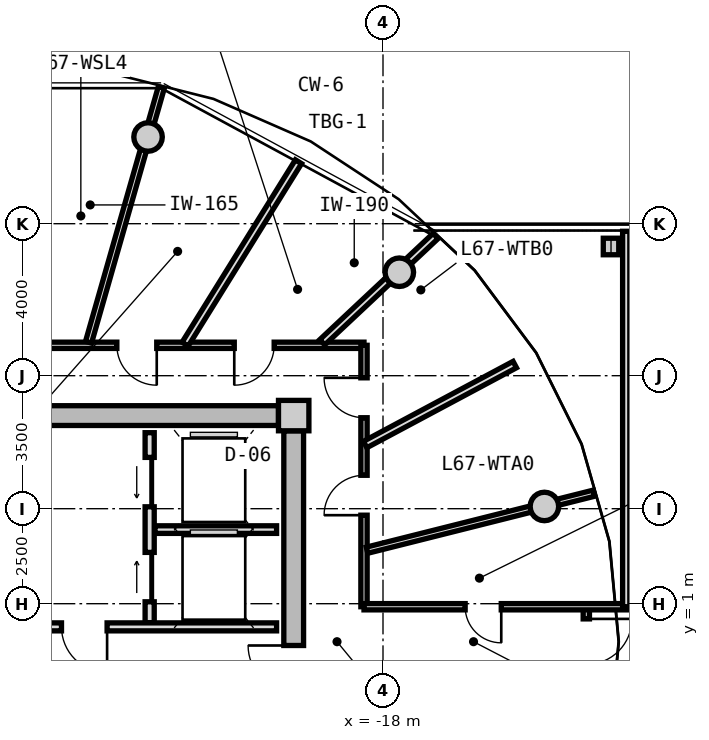
"""IFC4 building model, lengths in metres.
Left out: names, types, materials, properties, quantities, classifications, styles, units other than length and angle.
Written with IfcOpenShell. Run it as: python <this file> out.ifc"""

import sys

from ifc_helpers import new_model, si_unit, direction, frame, frame_2d, origin, origin_2d, place, context, subcontext, project, spatial, rectangle, circle, i_section, extrude, source, transform, mapped, element, fill, save


model = new_model("IFC4")
c1 = context("Model", 3, precision=1e-05, world=origin(), true_north=direction((0.0, 1.0)))
c2 = subcontext(c1, "Body", "Model", "MODEL_VIEW")
j1 = project(units=[si_unit("LENGTHUNIT", "METRE"), si_unit("PLANEANGLEUNIT", "RADIAN")], contexts=[c1])
p1 = place(None, origin())
s1 = spatial("IfcSite", under=j1, at=p1, CompositionType="ELEMENT")
p2 = place(p1, origin())
s2 = spatial("IfcBuilding", under=s1, at=p2, CompositionType="ELEMENT")
p3 = place(p2, frame((0.0, 0.0, 216.95)))
s3 = spatial("IfcBuildingStorey", under=s2, at=p3, CompositionType="ELEMENT", Elevation=216.95)
m1 = source(origin(), c2, "Body", "SweptSolid", [
    extrude(rectangle(XDim=0.8, YDim=0.8, at=origin_2d()), origin(), (0.0, 0.0, 1.0), 3.05),
])
p4 = place(p3, frame((-20.35, 5.95, 0.0), z_axis=(0.0, 0.0, 1.0), x_axis=(1.0, 0.0, 0.0)))
e1 = element("IfcColumn", 1, at=p4, inside=s3, PredefinedType="COLUMN", context=c2, shape_type="MappedRepresentation", body=[
    mapped(m1, transform((0.0, 0.0, 0.0), x_axis=(1.0, 0.0, 0.0), y_axis=(0.0, 1.0, 0.0), z_axis=(0.0, 0.0, 1.0), scale=1.0)),
])
m2 = source(origin(), c2, "Body", "SweptSolid", [
    extrude(rectangle(XDim=14.5, YDim=0.52, at=frame_2d((7.25, 0.0))), origin(), (0.0, 0.0, 1.0), 2.76),
])
p5 = place(p3, frame((-35.25, 5.95, 0.0), z_axis=(0.0, 0.0, 1.0), x_axis=(1.0, 0.0, 0.0)))
e2 = element("IfcWall", 2, at=p5, inside=s3, PredefinedType="SHEAR", context=c2, shape_type="MappedRepresentation", body=[
    mapped(m2, transform((0.0, 0.0, 0.0), x_axis=(1.0, 0.0, 0.0), y_axis=(0.0, 1.0, 0.0), z_axis=(0.0, 0.0, 1.0), scale=1.0)),
])
m3 = source(origin(), c2, "Body", "SweptSolid", [
    extrude(rectangle(XDim=11.1, YDim=0.52, at=frame_2d((5.55, 0.0))), origin(), (0.0, 0.0, 1.0), 2.76),
])
p6 = place(p3, frame((-20.35, 5.55, 0.0), z_axis=(0.0, 0.0, 1.0), x_axis=(0.0, -1.0, 0.0)))
e3 = element("IfcWall", 3, at=p6, inside=s3, PredefinedType="SHEAR", context=c2, shape_type="MappedRepresentation", body=[
    mapped(m3, transform((0.0, 0.0, 0.0), x_axis=(1.0, 0.0, 0.0), y_axis=(0.0, 1.0, 0.0), z_axis=(0.0, 0.0, 1.0), scale=1.0)),
])
p7 = place(p6, frame((5.65, 0.0, 0.0)))
e4 = element("IfcOpeningElement", 4, at=p7, cuts=e3, PredefinedType="OPENING", context=c2, shape_type="SweptSolid", body=[
    extrude(rectangle(XDim=1.2, YDim=2.15, at=frame_2d((0.6, 1.075))), frame((0.0, 0.27, 0.0), z_axis=(0.0, -1.0, 0.0), x_axis=(1.0, 0.0, 0.0)), (0.0, 0.0, 1.0), 0.54),
])
m4 = source(origin(), c2, "Body", "SweptSolid", [
    extrude(circle(Radius=0.375, at=origin_2d()), origin(), (0.0, 0.0, 1.0), 3.05),
])
for number, where, z_axis, x_axis in (
    (5, (-13.753, 3.559, 0.0), (0.0, 0.0, 1.0), (1.0, 0.0, 0.0)),
    (6, (-17.57, 9.723, 0.0), (0.0, 0.0, 1.0), (1.0, 0.0, 0.0)),
    (7, (-24.182, 13.281, 0.0), (0.0, 0.0, 1.0), (1.0, 0.0, 0.0)),
):
    element("IfcColumn", number, at=place(p3, frame(where, z_axis=z_axis, x_axis=x_axis)), inside=s3, PredefinedType="COLUMN", context=c2, shape_type="MappedRepresentation", body=[
        mapped(m4, transform((0.0, 0.0, 0.0), x_axis=(1.0, 0.0, 0.0), y_axis=(0.0, 1.0, 0.0), z_axis=(0.0, 0.0, 1.0), scale=1.0)),
    ])
m5 = source(origin(), c2, "Body", "SweptSolid", [
    extrude(i_section(OverallWidth=0.407, OverallDepth=0.435, WebThickness=0.024, FlangeThickness=0.039, FilletRadius=0.015, at=origin_2d()), origin(), (0.0, 0.0, 1.0), 3.05),
])
p8 = place(p3, frame((-12.0, 10.4, 0.0), z_axis=(0.0, 0.0, 1.0), x_axis=(1.0, 0.0, 0.0)))
e8 = element("IfcColumn", 8, at=p8, inside=s3, PredefinedType="COLUMN", context=c2, shape_type="MappedRepresentation", body=[
    mapped(m5, transform((0.0, 0.0, 0.0), x_axis=(1.0, 0.0, 0.0), y_axis=(0.0, 1.0, 0.0), z_axis=(0.0, 0.0, 1.0), scale=1.0)),
])
m6 = source(origin(), c2, "Body", "SweptSolid", [
    extrude(rectangle(XDim=5.0, YDim=0.24, at=frame_2d((2.5, 0.0))), origin(), (0.0, 0.0, 1.0), 2.745),
])
p9 = place(p3, frame((-24.14, 0.5, 0.0), z_axis=(0.0, 0.0, 1.0), x_axis=(0.0, 1.0, 0.0)))
e9 = element("IfcWall", 9, at=p9, inside=s3, PredefinedType="PARTITIONING", context=c2, shape_type="MappedRepresentation", body=[
    mapped(m6, transform((0.0, 0.0, 0.0), x_axis=(1.0, 0.0, 0.0), y_axis=(0.0, 1.0, 0.0), z_axis=(0.0, 0.0, 1.0), scale=1.0)),
])
p10 = place(p9, frame((3.05, 0.0, 0.0)))
e10 = element("IfcOpeningElement", 10, at=p10, cuts=e9, PredefinedType="OPENING", context=c2, shape_type="SweptSolid", body=[
    extrude(rectangle(XDim=1.3, YDim=2.2, at=frame_2d((0.65, 1.1))), frame((0.0, 0.13, 0.0), z_axis=(0.0, -1.0, 0.0), x_axis=(1.0, 0.0, 0.0)), (0.0, 0.0, 1.0), 0.26),
])
p11 = place(p9, frame((0.55, 0.0, 0.0)))
e11 = element("IfcOpeningElement", 11, at=p11, cuts=e9, PredefinedType="OPENING", context=c2, shape_type="SweptSolid", body=[
    extrude(rectangle(XDim=1.3, YDim=2.2, at=frame_2d((0.65, 1.1))), frame((0.0, 0.13, 0.0), z_axis=(0.0, -1.0, 0.0), x_axis=(1.0, 0.0, 0.0)), (0.0, 0.0, 1.0), 0.26),
])
m7 = source(origin(), c2, "Body", "SweptSolid", [
    extrude(rectangle(XDim=3.2, YDim=0.2, at=frame_2d((1.6, 0.0))), origin(), (0.0, 0.0, 1.0), 2.745),
])
p12 = place(p3, frame((-24.0, 2.95, 0.0), z_axis=(0.0, 0.0, 1.0), x_axis=(1.0, 0.0, 0.0)))
e12 = element("IfcWall", 12, at=p12, inside=s3, PredefinedType="PARTITIONING", context=c2, shape_type="MappedRepresentation", body=[
    mapped(m7, transform((0.0, 0.0, 0.0), x_axis=(1.0, 0.0, 0.0), y_axis=(0.0, 1.0, 0.0), z_axis=(0.0, 0.0, 1.0), scale=1.0)),
])
m8 = source(origin(), c2, "Body", "SweptSolid", [
    extrude(rectangle(XDim=6.66, YDim=0.21, at=frame_2d((3.33, 0.0))), origin(), (0.0, 0.0, 1.0), 2.745),
])
p13 = place(p3, frame((-27.46, 0.39, 0.0), z_axis=(0.0, 0.0, 1.0), x_axis=(1.0, 0.0, 0.0)))
e13 = element("IfcWall", 13, at=p13, inside=s3, PredefinedType="PARTITIONING", context=c2, shape_type="MappedRepresentation", body=[
    mapped(m8, transform((0.0, 0.0, 0.0), x_axis=(1.0, 0.0, 0.0), y_axis=(0.0, 1.0, 0.0), z_axis=(0.0, 0.0, 1.0), scale=1.0)),
])
p14 = place(p13, frame((1.0, 0.0, 0.0)))
e14 = element("IfcOpeningElement", 14, at=p14, cuts=e13, PredefinedType="OPENING", context=c2, shape_type="SweptSolid", body=[
    extrude(rectangle(XDim=1.2, YDim=2.15, at=frame_2d((0.6, 1.075))), frame((0.0, 0.115, 0.0), z_axis=(0.0, -1.0, 0.0), x_axis=(1.0, 0.0, 0.0)), (0.0, 0.0, 1.0), 0.23),
])
m9 = source(origin(), c2, "Body", "SweptSolid", [
    extrude(rectangle(XDim=8.58, YDim=0.165, at=frame_2d((4.29, 0.0))), origin(), (0.0, 0.0, 1.0), 2.745),
])
p15 = place(p3, frame((-27.08, 7.8, 0.0), z_axis=(0.0, 0.0, 1.0), x_axis=(1.0, 0.0, 0.0)))
e15 = element("IfcWall", 15, at=p15, inside=s3, PredefinedType="PARTITIONING", context=c2, shape_type="MappedRepresentation", body=[
    mapped(m9, transform((0.0, 0.0, 0.0), x_axis=(1.0, 0.0, 0.0), y_axis=(0.0, 1.0, 0.0), z_axis=(0.0, 0.0, 1.0), scale=1.0)),
])
p16 = place(p15, frame((5.166, 0.0, 0.0)))
e16 = element("IfcOpeningElement", 16, at=p16, cuts=e15, PredefinedType="OPENING", context=c2, shape_type="SweptSolid", body=[
    extrude(rectangle(XDim=1.05, YDim=2.15, at=frame_2d((0.525, 1.075))), frame((0.0, 0.093, 0.0), z_axis=(0.0, -1.0, 0.0), x_axis=(1.0, 0.0, 0.0)), (0.0, 0.0, 1.0), 0.185),
])
p17 = place(p15, frame((2.076, 0.0, 0.0)))
e17 = element("IfcOpeningElement", 17, at=p17, cuts=e15, PredefinedType="OPENING", context=c2, shape_type="SweptSolid", body=[
    extrude(rectangle(XDim=1.05, YDim=2.15, at=frame_2d((0.525, 1.075))), frame((0.0, 0.093, 0.0), z_axis=(0.0, -1.0, 0.0), x_axis=(1.0, 0.0, 0.0)), (0.0, 0.0, 1.0), 0.185),
])
m10 = source(origin(), c2, "Body", "SweptSolid", [
    extrude(rectangle(XDim=6.88, YDim=0.165, at=frame_2d((3.44, 0.0))), origin(), (0.0, 0.0, 1.0), 2.745),
])
p18 = place(p3, frame((-18.5, 7.8, 0.0), z_axis=(0.0, 0.0, 1.0), x_axis=(0.0, -1.0, 0.0)))
e18 = element("IfcWall", 18, at=p18, inside=s3, PredefinedType="PARTITIONING", context=c2, shape_type="MappedRepresentation", body=[
    mapped(m10, transform((0.0, 0.0, 0.0), x_axis=(1.0, 0.0, 0.0), y_axis=(0.0, 1.0, 0.0), z_axis=(0.0, 0.0, 1.0), scale=1.0)),
])
p19 = place(p18, frame((3.421, 0.0, 0.0)))
e19 = element("IfcOpeningElement", 19, at=p19, cuts=e18, PredefinedType="OPENING", context=c2, shape_type="SweptSolid", body=[
    extrude(rectangle(XDim=1.05, YDim=2.15, at=frame_2d((0.525, 1.075))), frame((0.0, 0.093, 0.0), z_axis=(0.0, -1.0, 0.0), x_axis=(1.0, 0.0, 0.0)), (0.0, 0.0, 1.0), 0.185),
])
p20 = place(p18, frame((0.856, 0.0, 0.0)))
e20 = element("IfcOpeningElement", 20, at=p20, cuts=e18, PredefinedType="OPENING", context=c2, shape_type="SweptSolid", body=[
    extrude(rectangle(XDim=1.05, YDim=2.15, at=frame_2d((0.525, 1.075))), frame((0.0, 0.093, 0.0), z_axis=(0.0, -1.0, 0.0), x_axis=(1.0, 0.0, 0.0)), (0.0, 0.0, 1.0), 0.185),
])
m11 = source(origin(), c2, "Body", "SweptSolid", [
    extrude(rectangle(XDim=6.974, YDim=0.165, at=frame_2d((3.487, 0.0))), origin(), (0.0, 0.0, 1.0), 2.345),
])
p21 = place(p3, frame((-25.749, 7.88, 0.0), z_axis=(0.0, 0.0, 1.0), x_axis=(0.274707256801, 0.961527910703, 0.0)))
e21 = element("IfcWall", 21, at=p21, inside=s3, PredefinedType="PARTITIONING", context=c2, shape_type="MappedRepresentation", body=[
    mapped(m11, transform((0.0, 0.0, 0.0), x_axis=(1.0, 0.0, 0.0), y_axis=(0.0, 1.0, 0.0), z_axis=(0.0, 0.0, 1.0), scale=1.0)),
])
m12 = source(origin(), c2, "Body", "SweptSolid", [
    extrude(rectangle(XDim=6.157, YDim=0.165, at=frame_2d((3.079, 0.0))), origin(), (0.0, 0.0, 1.0), 2.345),
])
p22 = place(p3, frame((-18.42, 2.407, 0.0), z_axis=(0.0, 0.0, 1.0), x_axis=(0.969840867184, 0.243738984038, 0.0)))
e22 = element("IfcWall", 22, at=p22, inside=s3, PredefinedType="PARTITIONING", context=c2, shape_type="MappedRepresentation", body=[
    mapped(m12, transform((0.0, 0.0, 0.0), x_axis=(1.0, 0.0, 0.0), y_axis=(0.0, 1.0, 0.0), z_axis=(0.0, 0.0, 1.0), scale=1.0)),
])
m13 = source(origin(), c2, "Body", "SweptSolid", [
    extrude(rectangle(XDim=4.089, YDim=0.19, at=frame_2d((2.044, 0.0))), origin(), (0.0, 0.0, 1.0), 2.345),
])
p23 = place(p3, frame((-19.598, 7.88, 0.0), z_axis=(0.0, 0.0, 1.0), x_axis=(0.729401273609, 0.684086092577, 0.0)))
e23 = element("IfcWall", 23, at=p23, inside=s3, PredefinedType="PARTITIONING", context=c2, shape_type="MappedRepresentation", body=[
    mapped(m13, transform((0.0, 0.0, 0.0), x_axis=(1.0, 0.0, 0.0), y_axis=(0.0, 1.0, 0.0), z_axis=(0.0, 0.0, 1.0), scale=1.0)),
])
m14 = source(origin(), c2, "Body", "SweptSolid", [
    extrude(rectangle(XDim=4.465, YDim=0.19, at=frame_2d((2.232, 0.0))), origin(), (0.0, 0.0, 1.0), 2.745),
])
p24 = place(p3, frame((-18.47, 5.188, 0.0), z_axis=(0.0, 0.0, 1.0), x_axis=(0.881981829834, 0.471283409259, 0.0)))
e24 = element("IfcWall", 24, at=p24, inside=s3, PredefinedType="PARTITIONING", context=c2, shape_type="MappedRepresentation", body=[
    mapped(m14, transform((0.0, 0.0, 0.0), x_axis=(1.0, 0.0, 0.0), y_axis=(0.0, 1.0, 0.0), z_axis=(0.0, 0.0, 1.0), scale=1.0)),
])
m15 = source(origin(), c2, "Body", "SweptSolid", [
    extrude(rectangle(XDim=5.652, YDim=0.19, at=frame_2d((2.826, 0.0))), origin(), (0.0, 0.0, 1.0), 2.745),
])
p25 = place(p3, frame((-23.206, 7.83, 0.0), z_axis=(0.0, 0.0, 1.0), x_axis=(0.527566076956, 0.84951399897, 0.0)))
e25 = element("IfcWall", 25, at=p25, inside=s3, PredefinedType="PARTITIONING", context=c2, shape_type="MappedRepresentation", body=[
    mapped(m15, transform((0.0, 0.0, 0.0), x_axis=(1.0, 0.0, 0.0), y_axis=(0.0, 1.0, 0.0), z_axis=(0.0, 0.0, 1.0), scale=1.0)),
])
m16 = source(origin(), c2, "Body", "SweptSolid", [
    extrude(rectangle(XDim=1.84, YDim=0.165, at=frame_2d((0.92, 0.0))), origin(), (0.0, 0.0, 1.0), 2.745),
])
p26 = place(p3, frame((-12.65, -0.92, 0.0), z_axis=(0.0, 0.0, 1.0), x_axis=(0.0, 1.0, 0.0)))
e26 = element("IfcWall", 26, at=p26, inside=s3, PredefinedType="PARTITIONING", context=c2, shape_type="MappedRepresentation", body=[
    mapped(m16, transform((0.0, 0.0, 0.0), x_axis=(1.0, 0.0, 0.0), y_axis=(0.0, 1.0, 0.0), z_axis=(0.0, 0.0, 1.0), scale=1.0)),
])
p27 = place(p26, frame((0.32, 0.0, 0.0)))
e27 = element("IfcOpeningElement", 27, at=p27, cuts=e26, PredefinedType="OPENING", context=c2, shape_type="SweptSolid", body=[
    extrude(rectangle(XDim=1.2, YDim=2.15, at=frame_2d((0.6, 1.075))), frame((0.0, 0.093, 0.0), z_axis=(0.0, -1.0, 0.0), x_axis=(1.0, 0.0, 0.0)), (0.0, 0.0, 1.0), 0.185),
])
m17 = source(origin(), c2, "Body", "SweptSolid", [
    extrude(rectangle(XDim=37.0, YDim=0.165, at=frame_2d((18.5, 0.0))), origin(), (0.0, 0.0, 1.0), 2.745),
])
p28 = place(p3, frame((-18.5, 0.92, 0.0), z_axis=(0.0, 0.0, 1.0), x_axis=(1.0, 0.0, 0.0)))
e28 = element("IfcWall", 28, at=p28, inside=s3, PredefinedType="PARTITIONING", context=c2, shape_type="MappedRepresentation", body=[
    mapped(m17, transform((0.0, 0.0, 0.0), x_axis=(1.0, 0.0, 0.0), y_axis=(0.0, 1.0, 0.0), z_axis=(0.0, 0.0, 1.0), scale=1.0)),
])
p29 = place(p28, frame((2.662, 0.0, 0.0)))
e29 = element("IfcOpeningElement", 29, at=p29, cuts=e28, PredefinedType="OPENING", context=c2, shape_type="SweptSolid", body=[
    extrude(rectangle(XDim=0.95, YDim=2.1, at=frame_2d((0.475, 1.05))), frame((0.0, 0.093, 0.0), z_axis=(0.0, -1.0, 0.0), x_axis=(1.0, 0.0, 0.0)), (0.0, 0.0, 1.0), 0.185),
])
p30 = place(p28, frame((33.388, 0.0, 0.0)))
e30 = element("IfcOpeningElement", 30, at=p30, cuts=e28, PredefinedType="OPENING", context=c2, shape_type="SweptSolid", body=[
    extrude(rectangle(XDim=0.95, YDim=2.1, at=frame_2d((0.475, 1.05))), frame((0.0, 0.093, 0.0), z_axis=(0.0, -1.0, 0.0), x_axis=(1.0, 0.0, 0.0)), (0.0, 0.0, 1.0), 0.185),
])
p31 = place(p28, frame((7.64, 0.0, 0.0)))
e31 = element("IfcOpeningElement", 31, at=p31, cuts=e28, PredefinedType="OPENING", context=c2, shape_type="SweptSolid", body=[
    extrude(rectangle(XDim=0.92, YDim=2.1, at=frame_2d((0.46, 1.05))), frame((0.0, 0.093, 0.0), z_axis=(0.0, -1.0, 0.0), x_axis=(1.0, 0.0, 0.0)), (0.0, 0.0, 1.0), 0.185),
])
p32 = place(p28, frame((10.275, 0.0, 0.0)))
e32 = element("IfcOpeningElement", 32, at=p32, cuts=e28, PredefinedType="OPENING", context=c2, shape_type="SweptSolid", body=[
    extrude(rectangle(XDim=1.25, YDim=2.2, at=frame_2d((0.625, 1.1))), frame((0.0, 0.093, 0.0), z_axis=(0.0, -1.0, 0.0), x_axis=(1.0, 0.0, 0.0)), (0.0, 0.0, 1.0), 0.185),
])
p33 = place(p28, frame((14.875, 0.0, 0.0)))
e33 = element("IfcOpeningElement", 33, at=p33, cuts=e28, PredefinedType="OPENING", context=c2, shape_type="SweptSolid", body=[
    extrude(rectangle(XDim=1.25, YDim=2.2, at=frame_2d((0.625, 1.1))), frame((0.0, 0.093, 0.0), z_axis=(0.0, -1.0, 0.0), x_axis=(1.0, 0.0, 0.0)), (0.0, 0.0, 1.0), 0.185),
])
p34 = place(p28, frame((23.03, 0.0, 0.0)))
e34 = element("IfcOpeningElement", 34, at=p34, cuts=e28, PredefinedType="OPENING", context=c2, shape_type="SweptSolid", body=[
    extrude(rectangle(XDim=1.25, YDim=2.2, at=frame_2d((0.625, 1.1))), frame((0.0, 0.093, 0.0), z_axis=(0.0, -1.0, 0.0), x_axis=(1.0, 0.0, 0.0)), (0.0, 0.0, 1.0), 0.185),
])
m18 = source(origin(), c2, "Body", "SweptSolid", [
    extrude(rectangle(XDim=9.88, YDim=0.19, at=frame_2d((4.94, 0.0))), origin(), (0.0, 0.0, 1.0), 2.745),
])
p35 = place(p3, frame((-11.6, 0.92, 0.0), z_axis=(0.0, 0.0, 1.0), x_axis=(0.0, 1.0, 0.0)))
e35 = element("IfcWall", 35, at=p35, inside=s3, PredefinedType="PARTITIONING", context=c2, shape_type="MappedRepresentation", body=[
    mapped(m18, transform((0.0, 0.0, 0.0), x_axis=(1.0, 0.0, 0.0), y_axis=(0.0, 1.0, 0.0), z_axis=(0.0, 0.0, 1.0), scale=1.0)),
])
m19 = source(origin(), c2, "Body", "SweptSolid", [
    extrude(rectangle(XDim=1.3, YDim=2.2, at=frame_2d((0.65, 1.1))), frame((0.0, 0.025, 0.0), z_axis=(0.0, -1.0, 0.0), x_axis=(1.0, 0.0, 0.0)), (0.0, 0.0, 1.0), 0.05),
])
p36 = place(p10, origin())
e36 = element("IfcDoor", 36, at=p36, inside=s3, OperationType="SLIDING_TO_LEFT", PredefinedType="DOOR", context=c2, shape_type="MappedRepresentation", body=[
    mapped(m19, transform((0.0, 0.0, 0.0), x_axis=(1.0, 0.0, 0.0), y_axis=(0.0, 1.0, 0.0), z_axis=(0.0, 0.0, 1.0), scale=1.0)),
])
fill(e10, e36)
p37 = place(p11, origin())
e37 = element("IfcDoor", 37, at=p37, inside=s3, OperationType="SLIDING_TO_RIGHT", PredefinedType="DOOR", context=c2, shape_type="MappedRepresentation", body=[
    mapped(m19, transform((0.0, 0.0, 0.0), x_axis=(1.0, 0.0, 0.0), y_axis=(0.0, 1.0, 0.0), z_axis=(0.0, 0.0, 1.0), scale=1.0)),
])
fill(e11, e37)
m20 = source(origin(), c2, "Body", "SweptSolid", [
    extrude(rectangle(XDim=1.2, YDim=2.15, at=frame_2d((0.6, 1.075))), frame((0.0, 0.025, 0.0), z_axis=(0.0, -1.0, 0.0), x_axis=(1.0, 0.0, 0.0)), (0.0, 0.0, 1.0), 0.05),
])
p38 = place(p14, frame((1.2, 0.0, 0.0), z_axis=(0.0, 0.0, 1.0), x_axis=(-1.0, 0.0, 0.0)))
e38 = element("IfcDoor", 38, at=p38, inside=s3, OperationType="SINGLE_SWING_LEFT", PredefinedType="DOOR", context=c2, shape_type="MappedRepresentation", body=[
    mapped(m20, transform((0.0, 0.0, 0.0), x_axis=(1.0, 0.0, 0.0), y_axis=(0.0, 1.0, 0.0), z_axis=(0.0, 0.0, 1.0), scale=1.0)),
])
fill(e14, e38)
p39 = place(p7, frame((1.2, 0.0, 0.0), z_axis=(0.0, 0.0, 1.0), x_axis=(-1.0, 0.0, 0.0)))
e39 = element("IfcDoor", 39, at=p39, inside=s3, OperationType="SINGLE_SWING_RIGHT", PredefinedType="DOOR", context=c2, shape_type="MappedRepresentation", body=[
    mapped(m20, transform((0.0, 0.0, 0.0), x_axis=(1.0, 0.0, 0.0), y_axis=(0.0, 1.0, 0.0), z_axis=(0.0, 0.0, 1.0), scale=1.0)),
])
fill(e4, e39)
m21 = source(origin(), c2, "Body", "SweptSolid", [
    extrude(rectangle(XDim=0.95, YDim=2.1, at=frame_2d((0.475, 1.05))), frame((0.0, 0.025, 0.0), z_axis=(0.0, -1.0, 0.0), x_axis=(1.0, 0.0, 0.0)), (0.0, 0.0, 1.0), 0.05),
])
p40 = place(p29, frame((0.95, 0.0, 0.0), z_axis=(0.0, 0.0, 1.0), x_axis=(-1.0, 0.0, 0.0)))
e40 = element("IfcDoor", 40, at=p40, inside=s3, OperationType="SINGLE_SWING_LEFT", PredefinedType="DOOR", context=c2, shape_type="MappedRepresentation", body=[
    mapped(m21, transform((0.0, 0.0, 0.0), x_axis=(1.0, 0.0, 0.0), y_axis=(0.0, 1.0, 0.0), z_axis=(0.0, 0.0, 1.0), scale=1.0)),
])
fill(e29, e40)
m22 = source(origin(), c2, "Body", "SweptSolid", [
    extrude(rectangle(XDim=1.05, YDim=2.15, at=frame_2d((0.525, 1.075))), frame((0.0, 0.025, 0.0), z_axis=(0.0, -1.0, 0.0), x_axis=(1.0, 0.0, 0.0)), (0.0, 0.0, 1.0), 0.05),
])
p41 = place(p19, frame((1.05, 0.0, 0.0), z_axis=(0.0, 0.0, 1.0), x_axis=(-1.0, 0.0, 0.0)))
e41 = element("IfcDoor", 41, at=p41, inside=s3, OperationType="SINGLE_SWING_LEFT", PredefinedType="DOOR", context=c2, shape_type="MappedRepresentation", body=[
    mapped(m22, transform((0.0, 0.0, 0.0), x_axis=(1.0, 0.0, 0.0), y_axis=(0.0, 1.0, 0.0), z_axis=(0.0, 0.0, 1.0), scale=1.0)),
])
fill(e19, e41)
p42 = place(p20, frame((1.05, 0.0, 0.0), z_axis=(0.0, 0.0, 1.0), x_axis=(-1.0, 0.0, 0.0)))
e42 = element("IfcDoor", 42, at=p42, inside=s3, OperationType="SINGLE_SWING_RIGHT", PredefinedType="DOOR", context=c2, shape_type="MappedRepresentation", body=[
    mapped(m22, transform((0.0, 0.0, 0.0), x_axis=(1.0, 0.0, 0.0), y_axis=(0.0, 1.0, 0.0), z_axis=(0.0, 0.0, 1.0), scale=1.0)),
])
fill(e20, e42)
p43 = place(p16, frame((1.05, 0.0, 0.0), z_axis=(0.0, 0.0, 1.0), x_axis=(-1.0, 0.0, 0.0)))
e43 = element("IfcDoor", 43, at=p43, inside=s3, OperationType="SINGLE_SWING_RIGHT", PredefinedType="DOOR", context=c2, shape_type="MappedRepresentation", body=[
    mapped(m22, transform((0.0, 0.0, 0.0), x_axis=(1.0, 0.0, 0.0), y_axis=(0.0, 1.0, 0.0), z_axis=(0.0, 0.0, 1.0), scale=1.0)),
])
fill(e16, e43)
p44 = place(p17, frame((1.05, 0.0, 0.0), z_axis=(0.0, 0.0, 1.0), x_axis=(-1.0, 0.0, 0.0)))
e44 = element("IfcDoor", 44, at=p44, inside=s3, OperationType="SINGLE_SWING_LEFT", PredefinedType="DOOR", context=c2, shape_type="MappedRepresentation", body=[
    mapped(m22, transform((0.0, 0.0, 0.0), x_axis=(1.0, 0.0, 0.0), y_axis=(0.0, 1.0, 0.0), z_axis=(0.0, 0.0, 1.0), scale=1.0)),
])
fill(e17, e44)
p45 = place(p27, frame((1.2, 0.0, 0.0), z_axis=(0.0, 0.0, 1.0), x_axis=(-1.0, 0.0, 0.0)))
e45 = element("IfcDoor", 45, at=p45, inside=s3, OperationType="SINGLE_SWING_LEFT", PredefinedType="DOOR", context=c2, shape_type="MappedRepresentation", body=[
    mapped(m20, transform((0.0, 0.0, 0.0), x_axis=(1.0, 0.0, 0.0), y_axis=(0.0, 1.0, 0.0), z_axis=(0.0, 0.0, 1.0), scale=1.0)),
])
fill(e27, e45)
save(model, sys.argv[1])
